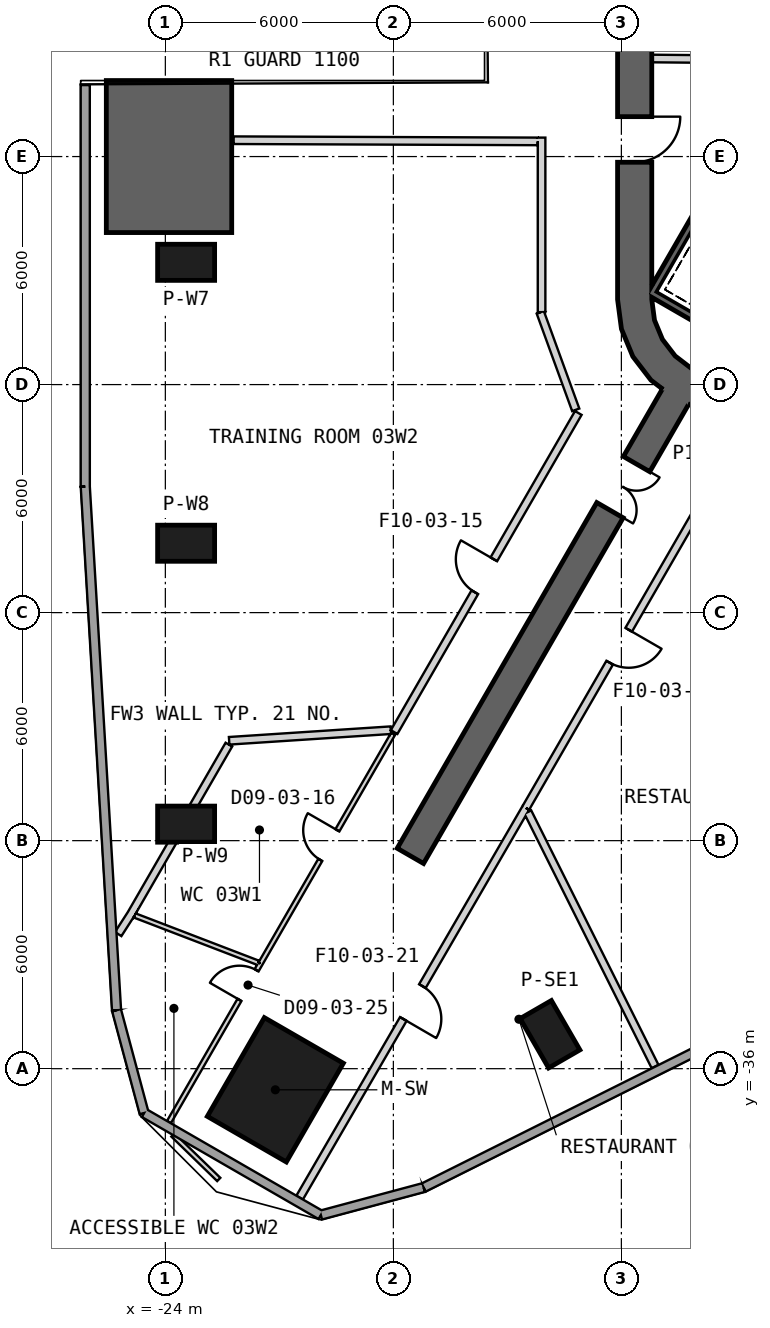
"""IFC4 building model, lengths in metres.
Left out: names, types, materials, properties, quantities, classifications, styles, units other than length and angle.
Written with IfcOpenShell. Run it as: python <this file> out.ifc"""

import sys

from ifc_helpers import new_model, si_unit, direction, frame, frame_2d, origin, origin_2d, place, context, subcontext, project, spatial, polyline, rectangle, outline, extrude, element, fill, save


model = new_model("IFC4")
c1 = context("Model", 3, precision=1e-05, world=origin(), true_north=direction((0.0, 1.0)))
c2 = subcontext(c1, "Body", "Model", "MODEL_VIEW")
j1 = project(units=[si_unit("LENGTHUNIT", "METRE"), si_unit("PLANEANGLEUNIT", "RADIAN")], contexts=[c1])
p1 = place(None, origin())
s1 = spatial("IfcSite", under=j1, at=p1, CompositionType="ELEMENT")
p2 = place(p1, origin())
s2 = spatial("IfcBuilding", under=s1, at=p2, CompositionType="ELEMENT")
p3 = place(p2, frame((0.0, 0.0, 21.5)))
s3 = spatial("IfcBuildingStorey", under=s2, at=p3, CompositionType="ELEMENT", Elevation=21.5)
p4 = place(p3, frame((-21.106, -36.556, 0.0), z_axis=(0.0, 0.0, 1.0), x_axis=(-0.5, -0.866025403784, 0.0)))
e1 = element("IfcColumn", 1, at=p4, inside=s3, PredefinedType="COLUMN", context=c2, shape_type="SweptSolid", body=[
    extrude(rectangle(XDim=3.0, YDim=2.4, at=origin_2d()), origin(), (0.0, 0.0, 1.0), 6.0),
])
for number, where, z_axis, x_axis in (
    (2, (-23.453, -14.783, 0.0), (0.0, 0.0, 1.0), (-1.0, 0.0, 0.0)),
    (3, (-23.453, -22.174, 0.0), (0.0, 0.0, 1.0), (-1.0, 0.0, 0.0)),
    (4, (-23.453, -29.566, 0.0), (0.0, 0.0, 1.0), (-1.0, 0.0, 0.0)),
    (5, (-13.878, -35.094, 0.0), (0.0, 0.0, 1.0), (0.5, -0.866, 0.0)),
):
    element("IfcColumn", number, at=place(p3, frame(where, z_axis=z_axis, x_axis=x_axis)), inside=s3, PredefinedType="COLUMN", context=c2, shape_type="SweptSolid", body=[
        extrude(rectangle(XDim=1.5, YDim=0.95, at=origin_2d()), origin(), (0.0, 0.0, 1.0), 6.0),
    ])
p5 = place(p3, frame((-11.65, 15.762, 0.0), z_axis=(0.0, 0.0, 1.0), x_axis=(0.0, -1.0, 0.0)))
e6 = element("IfcWall", 6, at=p5, inside=s3, PredefinedType="SHEAR", context=c2, shape_type="SweptSolid", body=[
    extrude(rectangle(XDim=31.523, YDim=0.9, at=frame_2d((15.762, 0.0))), origin(), (0.0, 0.0, 1.0), 6.0),
])
p6 = place(p5, frame((7.062, 0.0, 0.0)))
e7 = element("IfcOpeningElement", 7, at=p6, cuts=e6, PredefinedType="OPENING", context=c2, shape_type="SweptSolid", body=[
    extrude(rectangle(XDim=1.2, YDim=2.4, at=frame_2d((0.6, 1.2))), frame((0.0, 0.46, 0.0), z_axis=(0.0, -1.0, 0.0), x_axis=(1.0, 0.0, 0.0)), (0.0, 0.0, 1.0), 0.92),
])
p7 = place(p5, frame((9.762, 0.0, 0.0)))
e8 = element("IfcOpeningElement", 8, at=p7, cuts=e6, PredefinedType="OPENING", context=c2, shape_type="SweptSolid", body=[
    extrude(rectangle(XDim=1.2, YDim=2.4, at=frame_2d((0.6, 1.2))), frame((0.0, 0.46, 0.0), z_axis=(0.0, -1.0, 0.0), x_axis=(1.0, 0.0, 0.0)), (0.0, 0.0, 1.0), 0.92),
])
p8 = place(p5, frame((12.462, 0.0, 0.0)))
e9 = element("IfcOpeningElement", 9, at=p8, cuts=e6, PredefinedType="OPENING", context=c2, shape_type="SweptSolid", body=[
    extrude(rectangle(XDim=1.2, YDim=2.4, at=frame_2d((0.6, 1.2))), frame((0.0, 0.46, 0.0), z_axis=(0.0, -1.0, 0.0), x_axis=(1.0, 0.0, 0.0)), (0.0, 0.0, 1.0), 0.92),
])
p9 = place(p5, frame((15.162, 0.0, 0.0)))
e10 = element("IfcOpeningElement", 10, at=p9, cuts=e6, PredefinedType="OPENING", context=c2, shape_type="SweptSolid", body=[
    extrude(rectangle(XDim=1.2, YDim=2.4, at=frame_2d((0.6, 1.2))), frame((0.0, 0.46, 0.0), z_axis=(0.0, -1.0, 0.0), x_axis=(1.0, 0.0, 0.0)), (0.0, 0.0, 1.0), 0.92),
])
p10 = place(p5, frame((17.862, 0.0, 0.0)))
e11 = element("IfcOpeningElement", 11, at=p10, cuts=e6, PredefinedType="OPENING", context=c2, shape_type="SweptSolid", body=[
    extrude(rectangle(XDim=1.2, YDim=2.4, at=frame_2d((0.6, 1.2))), frame((0.0, 0.46, 0.0), z_axis=(0.0, -1.0, 0.0), x_axis=(1.0, 0.0, 0.0)), (0.0, 0.0, 1.0), 0.92),
])
p11 = place(p5, frame((20.562, 0.0, 0.0)))
e12 = element("IfcOpeningElement", 12, at=p11, cuts=e6, PredefinedType="OPENING", context=c2, shape_type="SweptSolid", body=[
    extrude(rectangle(XDim=1.2, YDim=2.4, at=frame_2d((0.6, 1.2))), frame((0.0, 0.46, 0.0), z_axis=(0.0, -1.0, 0.0), x_axis=(1.0, 0.0, 0.0)), (0.0, 0.0, 1.0), 0.92),
])
p12 = place(p5, frame((23.262, 0.0, 0.0)))
e13 = element("IfcOpeningElement", 13, at=p12, cuts=e6, PredefinedType="OPENING", context=c2, shape_type="SweptSolid", body=[
    extrude(rectangle(XDim=1.2, YDim=2.4, at=frame_2d((0.6, 1.2))), frame((0.0, 0.46, 0.0), z_axis=(0.0, -1.0, 0.0), x_axis=(1.0, 0.0, 0.0)), (0.0, 0.0, 1.0), 0.92),
])
p13 = place(p5, frame((3.612, 0.0, 0.0)))
e14 = element("IfcOpeningElement", 14, at=p13, cuts=e6, PredefinedType="OPENING", context=c2, shape_type="SweptSolid", body=[
    extrude(rectangle(XDim=1.2, YDim=2.4, at=frame_2d((0.6, 1.2))), frame((0.0, 0.46, 0.0), z_axis=(0.0, -1.0, 0.0), x_axis=(1.0, 0.0, 0.0)), (0.0, 0.0, 1.0), 0.92),
])
p14 = place(p5, frame((26.712, 0.0, 0.0)))
e15 = element("IfcOpeningElement", 15, at=p14, cuts=e6, PredefinedType="OPENING", context=c2, shape_type="SweptSolid", body=[
    extrude(rectangle(XDim=1.2, YDim=2.4, at=frame_2d((0.6, 1.2))), frame((0.0, 0.46, 0.0), z_axis=(0.0, -1.0, 0.0), x_axis=(1.0, 0.0, 0.0)), (0.0, 0.0, 1.0), 0.92),
])
p15 = place(p3, origin())
e16 = element("IfcWall", 16, at=p15, inside=s3, PredefinedType="SHEAR", context=c2, shape_type="SweptSolid", body=[
    extrude(outline(polyline([(-12.1, -15.762), (-11.998, -16.538), (-11.698, -17.262), (-11.221, -17.883), (-10.6, -18.36), (-9.876, -18.659), (-9.1, -18.762), (-8.323, -18.659), (-7.6, -18.36), (-8.05, -17.58), (-8.556, -17.79), (-9.1, -17.862), (-9.644, -17.79), (-10.15, -17.58), (-10.585, -17.247), (-10.919, -16.812), (-11.128, -16.305), (-11.2, -15.762), (-12.1, -15.762)])), origin(), (0.0, 0.0, 1.0), 6.0),
])
p16 = place(p3, frame((-10.575, -18.316, 0.0), z_axis=(0.0, 0.0, 1.0), x_axis=(-0.499996575515, -0.866027380903, 0.0)))
e17 = element("IfcWall", 17, at=p16, inside=s3, PredefinedType="SHEAR", context=c2, shape_type="SweptSolid", body=[
    extrude(rectangle(XDim=13.954, YDim=0.8, at=frame_2d((6.977, 0.0))), origin(), (0.0, 0.0, 1.0), 6.0),
])
p17 = place(p16, frame((2.05, 0.0, 0.0)))
e18 = element("IfcOpeningElement", 18, at=p17, cuts=e17, PredefinedType="OPENING", context=c2, shape_type="SweptSolid", body=[
    extrude(rectangle(XDim=1.4, YDim=2.4, at=frame_2d((0.7, 1.2))), frame((0.0, 0.41, 0.0), z_axis=(0.0, -1.0, 0.0), x_axis=(1.0, 0.0, 0.0)), (0.0, 0.0, 1.0), 0.82),
])
p18 = place(p3, origin())
e19 = element("IfcWall", 19, at=p18, inside=s3, PredefinedType="SHEAR", context=c2, shape_type="SweptSolid", body=[
    extrude(outline(polyline([(-25.553, -10.0), (-25.553, -14.0), (-22.253, -14.0), (-22.253, -10.0), (-25.553, -10.0)])), origin(), (0.0, 0.0, 1.0), 6.0),
])
p19 = place(p3, frame((-26.108, -10.119, 0.0), z_axis=(0.0, 0.0, 1.0), x_axis=(6.9319284e-05, -0.999999997597, 0.0)))
e20 = element("IfcWall", 20, at=p19, inside=s3, PredefinedType="SOLIDWALL", context=c2, shape_type="SweptSolid", body=[
    extrude(rectangle(XDim=10.566, YDim=0.24, at=frame_2d((5.283, 0.0))), origin(), (0.0, 0.0, 1.0), 5.7),
])
p20 = place(p3, frame((-26.107, -20.685, 0.0), z_axis=(0.0, 0.0, 1.0), x_axis=(0.059596169304, -0.998222568671, 0.0)))
e21 = element("IfcWall", 21, at=p20, inside=s3, PredefinedType="SOLIDWALL", context=c2, shape_type="SweptSolid", body=[
    extrude(rectangle(XDim=13.801, YDim=0.24, at=frame_2d((6.901, 0.0))), origin(), (0.0, 0.0, 1.0), 5.7),
])
p21 = place(p3, frame((-25.284, -34.462, 0.0), z_axis=(0.0, 0.0, 1.0), x_axis=(0.258850842196, -0.965917305723, 0.0)))
e22 = element("IfcWall", 22, at=p21, inside=s3, PredefinedType="SOLIDWALL", context=c2, shape_type="SweptSolid", body=[
    extrude(rectangle(XDim=2.8, YDim=0.24, at=frame_2d((1.4, 0.0))), origin(), (0.0, 0.0, 1.0), 5.7),
])
p22 = place(p3, frame((-24.56, -37.167, 0.0), z_axis=(0.0, 0.0, 1.0), x_axis=(0.866010734295, -0.500025407441, 0.0)))
e23 = element("IfcWall", 23, at=p22, inside=s3, PredefinedType="SOLIDWALL", context=c2, shape_type="SweptSolid", body=[
    extrude(rectangle(XDim=5.371, YDim=0.24, at=frame_2d((2.686, 0.0))), origin(), (0.0, 0.0, 1.0), 5.7),
])
p23 = place(p3, frame((-19.908, -39.853, 0.0), z_axis=(0.0, 0.0, 1.0), x_axis=(0.965923146675, 0.25882904535, 0.0)))
e24 = element("IfcWall", 24, at=p23, inside=s3, PredefinedType="SOLIDWALL", context=c2, shape_type="SweptSolid", body=[
    extrude(rectangle(XDim=2.801, YDim=0.24, at=frame_2d((1.4, 0.0))), origin(), (0.0, 0.0, 1.0), 5.7),
])
p24 = place(p3, frame((-17.203, -39.128, 0.0), z_axis=(0.0, 0.0, 1.0), x_axis=(0.894377655106, 0.447312653573, 0.0)))
e25 = element("IfcWall", 25, at=p24, inside=s3, PredefinedType="SOLIDWALL", context=c2, shape_type="SweptSolid", body=[
    extrude(rectangle(XDim=13.802, YDim=0.24, at=frame_2d((6.901, 0.0))), origin(), (0.0, 0.0, 1.0), 5.7),
])
p25 = place(p3, frame((-8.05, -9.449, 0.0), z_axis=(0.0, 0.0, 1.0), x_axis=(-0.999957467379, 0.009222983926, 0.0)))
e26 = element("IfcWall", 26, at=p25, inside=s3, PredefinedType="PLUMBINGWALL", context=c2, shape_type="SweptSolid", body=[
    extrude(rectangle(XDim=3.15, YDim=0.2, at=frame_2d((1.575, 0.0))), origin(), (0.0, 0.0, 1.0), 5.7),
])
p26 = place(p3, frame((-11.282, -15.541, -0.3), z_axis=(0.0, 0.0, 1.0), x_axis=(0.866000578957, -0.500042995397, 0.0)))
e27 = element("IfcWall", 27, at=p26, inside=s3, PredefinedType="SHEAR", context=c2, shape_type="SweptSolid", body=[
    extrude(rectangle(XDim=1.89, YDim=0.2, at=frame_2d((0.945, 0.0))), origin(), (0.0, 0.0, 1.0), 6.0),
])
p27 = place(p3, frame((-7.196, -8.663, -0.3), z_axis=(0.0, 0.0, 1.0), x_axis=(-0.499997992926, -0.866026562566, 0.0)))
e28 = element("IfcWall", 28, at=p27, inside=s3, PredefinedType="SHEAR", context=c2, shape_type="SweptSolid", body=[
    extrude(rectangle(XDim=7.9, YDim=0.2, at=frame_2d((3.95, 0.0))), origin(), (0.0, 0.0, 1.0), 6.0),
])
p28 = place(p3, frame((-14.1, -11.501, 0.0), z_axis=(0.0, 0.0, 1.0), x_axis=(0.0, -1.0, 0.0)))
e29 = element("IfcWall", 29, at=p28, inside=s3, PredefinedType="PARTITIONING", context=c2, shape_type="SweptSolid", body=[
    extrude(rectangle(XDim=4.592, YDim=0.2, at=frame_2d((2.296, 0.0))), origin(), (0.0, 0.0, 1.0), 4.88),
])
p29 = place(p3, frame((-17.98, -27.143, 0.0), z_axis=(0.0, 0.0, 1.0), x_axis=(0.499987665054, 0.866032525252, 0.0)))
e30 = element("IfcWall", 30, at=p29, inside=s3, PredefinedType="PARTITIONING", context=c2, shape_type="SweptSolid", body=[
    extrude(rectangle(XDim=9.695, YDim=0.2, at=frame_2d((4.848, 0.0))), origin(), (0.0, 0.0, 1.0), 5.7),
])
p30 = place(p29, frame((4.249, 0.0, 0.0)))
e31 = element("IfcOpeningElement", 31, at=p30, cuts=e30, PredefinedType="OPENING", context=c2, shape_type="SweptSolid", body=[
    extrude(rectangle(XDim=1.0, YDim=2.1, at=frame_2d((0.5, 1.05))), frame((0.0, 0.11, 0.0), z_axis=(0.0, -1.0, 0.0), x_axis=(1.0, 0.0, 0.0)), (0.0, 0.0, 1.0), 0.22),
])
p31 = place(p3, frame((-14.134, -16.1, 0.0), z_axis=(0.0, 0.0, 1.0), x_axis=(0.341951326322, -0.939717665273, 0.0)))
e32 = element("IfcWall", 32, at=p31, inside=s3, PredefinedType="PARTITIONING", context=c2, shape_type="SweptSolid", body=[
    extrude(rectangle(XDim=2.729, YDim=0.2, at=frame_2d((1.365, 0.0))), origin(), (0.0, 0.0, 1.0), 4.78),
])
p32 = place(p3, frame((-22.203, -11.57, 0.0), z_axis=(0.0, 0.0, 1.0), x_axis=(0.999992495389, -0.003874166344, 0.0)))
e33 = element("IfcWall", 33, at=p32, inside=s3, PredefinedType="PARTITIONING", context=c2, shape_type="SweptSolid", body=[
    extrude(rectangle(XDim=8.003, YDim=0.2, at=frame_2d((4.001, 0.0))), origin(), (0.0, 0.0, 1.0), 5.17),
])
p33 = place(p3, frame((-23.906, -37.406, 0.0), z_axis=(0.0, 0.0, 1.0), x_axis=(0.500013369766, 0.866017684609, 0.0)))
e34 = element("IfcWall", 34, at=p33, inside=s3, PredefinedType="PARTITIONING", context=c2, shape_type="SweptSolid", body=[
    extrude(rectangle(XDim=4.819, YDim=0.12, at=frame_2d((2.409, 0.0))), origin(), (0.0, 0.0, 1.0), 5.7),
])
p34 = place(p33, frame((3.714, 0.0, 0.0)))
e35 = element("IfcOpeningElement", 35, at=p34, cuts=e34, PredefinedType="OPENING", context=c2, shape_type="SweptSolid", body=[
    extrude(rectangle(XDim=0.9, YDim=2.1, at=frame_2d((0.45, 1.05))), frame((0.0, 0.07, 0.0), z_axis=(0.0, -1.0, 0.0), x_axis=(1.0, 0.0, 0.0)), (0.0, 0.0, 1.0), 0.14),
])
p35 = place(p3, frame((-21.496, -33.233, 0.0), z_axis=(0.0, 0.0, 1.0), x_axis=(0.500000091514, 0.866025350949, 0.0)))
e36 = element("IfcWall", 36, at=p35, inside=s3, PredefinedType="PARTITIONING", context=c2, shape_type="SweptSolid", body=[
    extrude(rectangle(XDim=6.978, YDim=0.12, at=frame_2d((3.489, 0.0))), origin(), (0.0, 0.0, 1.0), 5.7),
])
p36 = place(p35, frame((3.148, 0.0, 0.0)))
e37 = element("IfcOpeningElement", 37, at=p36, cuts=e36, PredefinedType="OPENING", context=c2, shape_type="SweptSolid", body=[
    extrude(rectangle(XDim=0.9, YDim=2.1, at=frame_2d((0.45, 1.05))), frame((0.0, 0.07, 0.0), z_axis=(0.0, -1.0, 0.0), x_axis=(1.0, 0.0, 0.0)), (0.0, 0.0, 1.0), 0.14),
])
p37 = place(p3, frame((-23.8, -37.744, 0.0), z_axis=(0.0, 0.0, 1.0), x_axis=(0.717273158196, -0.696792089888, 0.0)))
e38 = element("IfcWall", 38, at=p37, inside=s3, PredefinedType="PARTITIONING", context=c2, shape_type="SweptSolid", body=[
    extrude(rectangle(XDim=1.681, YDim=0.12, at=frame_2d((0.84, 0.0))), origin(), (0.0, 0.0, 1.0), 5.7),
])
p38 = place(p3, frame((-22.321, -27.373, 0.0), z_axis=(0.0, 0.0, 1.0), x_axis=(0.997859032733, 0.065401458642, 0.0)))
e39 = element("IfcWall", 39, at=p38, inside=s3, PredefinedType="PARTITIONING", context=c2, shape_type="SweptSolid", body=[
    extrude(rectangle(XDim=4.263, YDim=0.2, at=frame_2d((2.131, 0.0))), origin(), (0.0, 0.0, 1.0), 4.78),
])
p39 = place(p3, frame((-24.932, -31.984, 0.0), z_axis=(0.0, 0.0, 1.0), x_axis=(0.500010513267, 0.866019333862, 0.0)))
e40 = element("IfcWall", 40, at=p39, inside=s3, PredefinedType="PARTITIONING", context=c2, shape_type="SweptSolid", body=[
    extrude(rectangle(XDim=5.209, YDim=0.2, at=frame_2d((2.604, 0.0))), origin(), (0.0, 0.0, 1.0), 4.78),
])
p40 = place(p3, frame((-25.241, -32.458, 0.0), z_axis=(0.0, 0.0, 1.0), x_axis=(0.540924282728, 0.841071293266, 0.0)))
e41 = element("IfcWall", 41, at=p40, inside=s3, PredefinedType="PARTITIONING", context=c2, shape_type="SweptSolid", body=[
    extrude(rectangle(XDim=0.666, YDim=0.2, at=frame_2d((0.333, 0.0))), origin(), (0.0, 0.0, 1.0), 5.7),
])
p41 = place(p3, frame((-24.808, -31.968, 0.0), z_axis=(0.0, 0.0, 1.0), x_axis=(0.933675816779, -0.358119350445, 0.0)))
e42 = element("IfcWall", 42, at=p41, inside=s3, PredefinedType="PARTITIONING", context=c2, shape_type="SweptSolid", body=[
    extrude(rectangle(XDim=3.483, YDim=0.12, at=frame_2d((1.741, 0.0))), origin(), (0.0, 0.0, 1.0), 5.7),
])
p42 = place(p3, frame((-14.514, -29.139, 0.0), z_axis=(0.0, 0.0, 1.0), x_axis=(-0.502061989067, -0.864831636294, 0.0)))
e43 = element("IfcWall", 43, at=p42, inside=s3, PredefinedType="PARTITIONING", context=c2, shape_type="SweptSolid", body=[
    extrude(rectangle(XDim=11.855, YDim=0.2, at=frame_2d((5.928, 0.0))), origin(), (0.0, 0.0, 1.0), 5.7),
])
p43 = place(p42, frame((5.421, 0.0, 0.0)))
e44 = element("IfcOpeningElement", 44, at=p43, cuts=e43, PredefinedType="OPENING", context=c2, shape_type="SweptSolid", body=[
    extrude(rectangle(XDim=1.0, YDim=2.1, at=frame_2d((0.5, 1.05))), frame((0.0, 0.11, 0.0), z_axis=(0.0, -1.0, 0.0), x_axis=(1.0, 0.0, 0.0)), (0.0, 0.0, 1.0), 0.22),
])
p44 = place(p3, frame((-9.758, -20.901, 0.0), z_axis=(0.0, 0.0, 1.0), x_axis=(-0.499997931106, -0.866026598257, 0.0)))
e45 = element("IfcWall", 45, at=p44, inside=s3, PredefinedType="PARTITIONING", context=c2, shape_type="SweptSolid", body=[
    extrude(rectangle(XDim=9.513, YDim=0.2, at=frame_2d((4.756, 0.0))), origin(), (0.0, 0.0, 1.0), 5.7),
])
p45 = place(p44, frame((4.1, 0.0, 0.0)))
e46 = element("IfcOpeningElement", 46, at=p45, cuts=e45, PredefinedType="OPENING", context=c2, shape_type="SweptSolid", body=[
    extrude(rectangle(XDim=1.0, YDim=2.1, at=frame_2d((0.5, 1.05))), frame((0.0, 0.11, 0.0), z_axis=(0.0, -1.0, 0.0), x_axis=(1.0, 0.0, 0.0)), (0.0, 0.0, 1.0), 0.22),
])
p46 = place(p3, frame((-14.462, -29.248, 0.0), z_axis=(0.0, 0.0, 1.0), x_axis=(0.447304919826, -0.894381523009, 0.0)))
e47 = element("IfcWall", 47, at=p46, inside=s3, PredefinedType="PARTITIONING", context=c2, shape_type="SweptSolid", body=[
    extrude(rectangle(XDim=7.485, YDim=0.2, at=frame_2d((3.743, 0.0))), origin(), (0.0, 0.0, 1.0), 4.78),
])
p47 = place(p30, origin())
e48 = element("IfcDoor", 48, at=p47, inside=s3, OperationType="SINGLE_SWING_RIGHT", PredefinedType="USERDEFINED", context=c2, shape_type="SweptSolid", body=[
    extrude(rectangle(XDim=1.0, YDim=2.1, at=frame_2d((0.5, 1.05))), frame((0.0, 0.025, 0.0), z_axis=(0.0, -1.0, 0.0), x_axis=(1.0, 0.0, 0.0)), (0.0, 0.0, 1.0), 0.05),
])
fill(e31, e48)
p48 = place(p36, origin())
e49 = element("IfcDoor", 49, at=p48, inside=s3, OperationType="SINGLE_SWING_RIGHT", PredefinedType="NOTDEFINED", context=c2, shape_type="SweptSolid", body=[
    extrude(rectangle(XDim=0.9, YDim=2.1, at=frame_2d((0.45, 1.05))), frame((0.0, 0.025, 0.0), z_axis=(0.0, -1.0, 0.0), x_axis=(1.0, 0.0, 0.0)), (0.0, 0.0, 1.0), 0.05),
])
fill(e37, e49)
p49 = place(p43, origin())
e50 = element("IfcDoor", 50, at=p49, inside=s3, OperationType="SINGLE_SWING_RIGHT", PredefinedType="USERDEFINED", context=c2, shape_type="SweptSolid", body=[
    extrude(rectangle(XDim=1.0, YDim=2.1, at=frame_2d((0.5, 1.05))), frame((0.0, 0.025, 0.0), z_axis=(0.0, -1.0, 0.0), x_axis=(1.0, 0.0, 0.0)), (0.0, 0.0, 1.0), 0.05),
])
fill(e44, e50)
p50 = place(p45, origin())
e51 = element("IfcDoor", 51, at=p50, inside=s3, OperationType="SINGLE_SWING_LEFT", PredefinedType="USERDEFINED", context=c2, shape_type="SweptSolid", body=[
    extrude(rectangle(XDim=1.0, YDim=2.1, at=frame_2d((0.5, 1.05))), frame((0.0, 0.025, 0.0), z_axis=(0.0, -1.0, 0.0), x_axis=(1.0, 0.0, 0.0)), (0.0, 0.0, 1.0), 0.05),
])
fill(e46, e51)
p51 = place(p34, origin())
e52 = element("IfcDoor", 52, at=p51, inside=s3, OperationType="SINGLE_SWING_LEFT", PredefinedType="NOTDEFINED", context=c2, shape_type="SweptSolid", body=[
    extrude(rectangle(XDim=0.9, YDim=2.1, at=frame_2d((0.45, 1.05))), frame((0.0, 0.025, 0.0), z_axis=(0.0, -1.0, 0.0), x_axis=(1.0, 0.0, 0.0)), (0.0, 0.0, 1.0), 0.05),
])
fill(e35, e52)
p52 = place(p14, origin())
e53 = element("IfcDoor", 53, at=p52, inside=s3, OperationType="SINGLE_SWING_LEFT", PredefinedType="USERDEFINED", context=c2, shape_type="SweptSolid", body=[
    extrude(rectangle(XDim=1.2, YDim=2.4, at=frame_2d((0.6, 1.2))), frame((0.0, 0.025, 0.0), z_axis=(0.0, -1.0, 0.0), x_axis=(1.0, 0.0, 0.0)), (0.0, 0.0, 1.0), 0.05),
])
fill(e15, e53)
p53 = place(p17, origin())
e54 = element("IfcDoor", 54, at=p53, inside=s3, OperationType="DOUBLE_DOOR_SINGLE_SWING", PredefinedType="NOTDEFINED", context=c2, shape_type="SweptSolid", body=[
    extrude(rectangle(XDim=1.4, YDim=2.4, at=frame_2d((0.7, 1.2))), frame((0.0, 0.025, 0.0), z_axis=(0.0, -1.0, 0.0), x_axis=(1.0, 0.0, 0.0)), (0.0, 0.0, 1.0), 0.05),
])
fill(e18, e54)
save(model, sys.argv[1])
